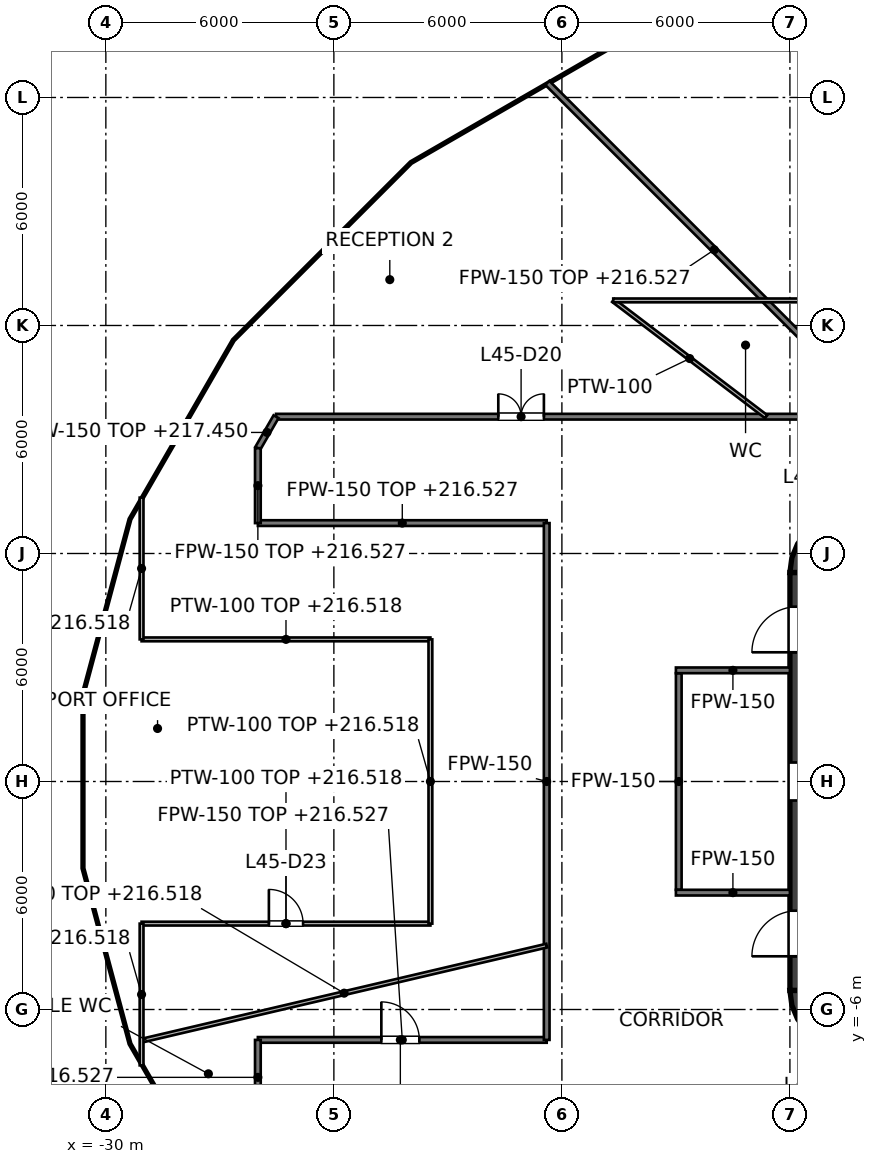
"""IFC4 building model, lengths in metres.
Left out: names, types, materials, properties, quantities, classifications, styles, units other than length and angle.
Written with IfcOpenShell. Run it as: python <this file> out.ifc"""

import sys

from ifc_helpers import new_model, si_unit, direction, frame, frame_2d, origin, place, context, subcontext, project, spatial, polyline, rectangle, outline, extrude, element, fill, save


model = new_model("IFC4")
c1 = context("Model", 3, precision=1e-05, world=origin(), true_north=direction((0.0, 1.0)))
c2 = subcontext(c1, "Body", "Model", "MODEL_VIEW")
j1 = project(units=[si_unit("LENGTHUNIT", "METRE"), si_unit("PLANEANGLEUNIT", "RADIAN")], contexts=[c1])
p1 = place(None, origin())
s1 = spatial("IfcSite", under=j1, at=p1, CompositionType="ELEMENT")
p2 = place(p1, origin())
s2 = spatial("IfcBuilding", under=s1, at=p2, CompositionType="ELEMENT")
p3 = place(p2, frame((0.0, 0.0, 213.6)))
s3 = spatial("IfcBuildingStorey", under=s2, at=p3, CompositionType="ELEMENT", Elevation=213.6)
p4 = place(p3, frame((-11.8, -5.5, 0.0), z_axis=(0.0, 0.0, 1.0), x_axis=(0.0, 1.0, 0.0)))
e1 = element("IfcWall", 1, at=p4, inside=s3, PredefinedType="SHEAR", context=c2, shape_type="SweptSolid", body=[
    extrude(rectangle(XDim=11.0, YDim=0.4, at=frame_2d((5.5, 0.0))), origin(), (0.0, 0.0, 1.0), 4.0),
])
p5 = place(p4, frame((5.0, 0.0, 0.0)))
e2 = element("IfcOpeningElement", 2, at=p5, cuts=e1, PredefinedType="OPENING", context=c2, shape_type="SweptSolid", body=[
    extrude(rectangle(XDim=1.0, YDim=2.1, at=frame_2d((0.5, 1.05))), frame((0.0, 0.2, 0.0), z_axis=(0.0, -1.0, 0.0), x_axis=(1.0, 0.0, 0.0)), (0.0, 0.0, 1.0), 0.4),
])
p6 = place(p4, frame((0.9, 0.0, 0.0)))
e3 = element("IfcOpeningElement", 3, at=p6, cuts=e1, PredefinedType="OPENING", context=c2, shape_type="SweptSolid", body=[
    extrude(rectangle(XDim=1.2, YDim=2.1, at=frame_2d((0.6, 1.05))), frame((0.0, 0.2, 0.0), z_axis=(0.0, -1.0, 0.0), x_axis=(1.0, 0.0, 0.0)), (0.0, 0.0, 1.0), 0.4),
])
p7 = place(p4, frame((8.9, 0.0, 0.0)))
e4 = element("IfcOpeningElement", 4, at=p7, cuts=e1, PredefinedType="OPENING", context=c2, shape_type="SweptSolid", body=[
    extrude(rectangle(XDim=1.2, YDim=2.1, at=frame_2d((0.6, 1.05))), frame((0.0, 0.2, 0.0), z_axis=(0.0, -1.0, 0.0), x_axis=(1.0, 0.0, 0.0)), (0.0, 0.0, 1.0), 0.4),
])
p8 = place(p3, origin())
e5 = element("IfcWall", 5, at=p8, inside=s3, PredefinedType="SHEAR", context=c2, shape_type="SweptSolid", body=[
    extrude(outline(polyline([(-12.0, 5.5), (-11.596, 5.5), (-11.559, 5.784), (-11.45, 6.048), (-11.275, 6.275), (-11.048, 6.45), (-10.784, 6.559), (-10.5, 6.596), (-10.5, 7.0), (-10.888, 6.949), (-11.25, 6.799), (-11.561, 6.561), (-11.799, 6.25), (-11.949, 5.888), (-12.0, 5.5)])), origin(), (0.0, 0.0, 1.0), 4.0),
])
e6 = element("IfcWall", 6, at=p8, inside=s3, PredefinedType="SHEAR", context=c2, shape_type="SweptSolid", body=[
    extrude(outline(polyline([(-10.5, -7.0), (-10.5, -6.596), (-10.784, -6.559), (-11.048, -6.45), (-11.275, -6.275), (-11.45, -6.048), (-11.559, -5.784), (-11.596, -5.5), (-12.0, -5.5), (-11.949, -5.888), (-11.799, -6.25), (-11.561, -6.561), (-11.25, -6.799), (-10.888, -6.949), (-10.5, -7.0)])), origin(), (0.0, 0.0, 1.0), 4.0),
])
p9 = place(p3, frame((-14.925, -2.85, 0.0), z_axis=(0.0, 0.0, 1.0), x_axis=(0.0, 1.0, 0.0)))
e7 = element("IfcWall", 7, at=p9, inside=s3, PredefinedType="PARTITIONING", context=c2, shape_type="SweptSolid", body=[
    extrude(rectangle(XDim=5.7, YDim=0.15, at=frame_2d((2.85, 0.0))), origin(), (0.0, 0.0, 1.0), 2.918),
])
for number, where, z_axis, x_axis in (
    (8, (-15.0, 2.925, 0.0), (0.0, 0.0, 1.0), (1.0, 0.0, 0.0)),
    (9, (-15.0, -2.925, 0.0), (0.0, 0.0, 1.0), (1.0, 0.0, 0.0)),
):
    element("IfcWall", number, at=place(p3, frame(where, z_axis=z_axis, x_axis=x_axis)), inside=s3, PredefinedType="PARTITIONING", context=c2, shape_type="SweptSolid", body=[
        extrude(rectangle(XDim=3.0, YDim=0.15, at=frame_2d((1.5, 0.0))), origin(), (0.0, 0.0, 1.0), 2.918),
    ])
p10 = place(p3, frame((-18.383, 18.383, 0.0), z_axis=(0.0, 0.0, 1.0), x_axis=(0.707106781187, -0.707106781187, 0.0)))
e10 = element("IfcWall", 10, at=p10, inside=s3, PredefinedType="PARTITIONING", context=c2, shape_type="SweptSolid", body=[
    extrude(rectangle(XDim=12.421, YDim=0.15, at=frame_2d((6.21, 0.0))), origin(), (0.0, 0.0, 1.0), 2.927),
])
p11 = place(p3, frame((-26.0, -6.8, 0.0), z_axis=(0.0, 0.0, 1.0), x_axis=(1.0, 0.0, 0.0)))
e11 = element("IfcWall", 11, at=p11, inside=s3, PredefinedType="PARTITIONING", context=c2, shape_type="SweptSolid", body=[
    extrude(rectangle(XDim=7.6, YDim=0.15, at=frame_2d((3.8, 0.0))), origin(), (0.0, 0.0, 1.0), 2.927),
])
p12 = place(p11, frame((3.249, 0.0, 0.0)))
e12 = element("IfcOpeningElement", 12, at=p12, cuts=e11, PredefinedType="OPENING", context=c2, shape_type="SweptSolid", body=[
    extrude(rectangle(XDim=1.0, YDim=2.1, at=frame_2d((0.5, 1.05))), frame((0.0, 0.075, 0.0), z_axis=(0.0, -1.0, 0.0), x_axis=(1.0, 0.0, 0.0)), (0.0, 0.0, 1.0), 0.15),
])
p13 = place(p3, frame((-26.0, 6.8, 0.0), z_axis=(0.0, 0.0, 1.0), x_axis=(1.0, 0.0, 0.0)))
e13 = element("IfcWall", 13, at=p13, inside=s3, PredefinedType="PARTITIONING", context=c2, shape_type="SweptSolid", body=[
    extrude(rectangle(XDim=7.6, YDim=0.15, at=frame_2d((3.8, 0.0))), origin(), (0.0, 0.0, 1.0), 2.927),
])
p14 = place(p3, frame((-25.522, 9.6, 0.0), z_axis=(0.0, 0.0, 1.0), x_axis=(1.0, 0.0, 0.0)))
e14 = element("IfcWall", 14, at=p14, inside=s3, PredefinedType="PARTITIONING", context=c2, shape_type="SweptSolid", body=[
    extrude(rectangle(XDim=51.044, YDim=0.15, at=frame_2d((25.522, 0.0))), origin(), (0.0, 0.0, 1.0), 2.927),
])
p15 = place(p14, frame((28.517, 0.0, 0.0)))
e15 = element("IfcOpeningElement", 15, at=p15, cuts=e14, PredefinedType="OPENING", context=c2, shape_type="SweptSolid", body=[
    extrude(rectangle(XDim=1.0, YDim=2.1, at=frame_2d((0.5, 1.05))), frame((0.0, 0.075, 0.0), z_axis=(0.0, -1.0, 0.0), x_axis=(1.0, 0.0, 0.0)), (0.0, 0.0, 1.0), 0.15),
])
p16 = place(p14, frame((24.65, 0.0, 0.0)))
e16 = element("IfcOpeningElement", 16, at=p16, cuts=e14, PredefinedType="OPENING", context=c2, shape_type="SweptSolid", body=[
    extrude(rectangle(XDim=1.0, YDim=2.1, at=frame_2d((0.5, 1.05))), frame((0.0, 0.075, 0.0), z_axis=(0.0, -1.0, 0.0), x_axis=(1.0, 0.0, 0.0)), (0.0, 0.0, 1.0), 0.15),
])
p17 = place(p14, frame((19.126, 0.0, 0.0)))
e17 = element("IfcOpeningElement", 17, at=p17, cuts=e14, PredefinedType="OPENING", context=c2, shape_type="SweptSolid", body=[
    extrude(rectangle(XDim=1.0, YDim=2.1, at=frame_2d((0.5, 1.05))), frame((0.0, 0.075, 0.0), z_axis=(0.0, -1.0, 0.0), x_axis=(1.0, 0.0, 0.0)), (0.0, 0.0, 1.0), 0.15),
])
p18 = place(p14, frame((13.909, 0.0, 0.0)))
e18 = element("IfcOpeningElement", 18, at=p18, cuts=e14, PredefinedType="OPENING", context=c2, shape_type="SweptSolid", body=[
    extrude(rectangle(XDim=1.0, YDim=2.1, at=frame_2d((0.5, 1.05))), frame((0.0, 0.075, 0.0), z_axis=(0.0, -1.0, 0.0), x_axis=(1.0, 0.0, 0.0)), (0.0, 0.0, 1.0), 0.15),
])
p19 = place(p14, frame((5.848, 0.0, 0.0)))
e19 = element("IfcOpeningElement", 19, at=p19, cuts=e14, PredefinedType="OPENING", context=c2, shape_type="SweptSolid", body=[
    extrude(rectangle(XDim=1.2, YDim=2.1, at=frame_2d((0.6, 1.05))), frame((0.0, 0.075, 0.0), z_axis=(0.0, -1.0, 0.0), x_axis=(1.0, 0.0, 0.0)), (0.0, 0.0, 1.0), 0.15),
])
p20 = place(p14, frame((38.575, 0.0, 0.0)))
e20 = element("IfcOpeningElement", 20, at=p20, cuts=e14, PredefinedType="OPENING", context=c2, shape_type="SweptSolid", body=[
    extrude(rectangle(XDim=1.0, YDim=2.1, at=frame_2d((0.5, 1.05))), frame((0.0, 0.075, 0.0), z_axis=(0.0, -1.0, 0.0), x_axis=(1.0, 0.0, 0.0)), (0.0, 0.0, 1.0), 0.15),
])
p21 = place(p3, frame((-26.0, 8.771, 0.0), z_axis=(0.0, 0.0, 1.0), x_axis=(0.499980071345, 0.866036909293, 0.0)))
e21 = element("IfcWall", 21, at=p21, inside=s3, PredefinedType="PARTITIONING", context=c2, shape_type="SweptSolid", body=[
    extrude(rectangle(XDim=0.957, YDim=0.15, at=frame_2d((0.479, 0.0))), origin(), (0.0, 0.0, 1.0), 3.85),
])
p22 = place(p3, frame((-18.4, -6.8, 0.0), z_axis=(0.0, 0.0, 1.0), x_axis=(0.0, 1.0, 0.0)))
e22 = element("IfcWall", 22, at=p22, inside=s3, PredefinedType="PARTITIONING", context=c2, shape_type="SweptSolid", body=[
    extrude(rectangle(XDim=13.6, YDim=0.15, at=frame_2d((6.8, 0.0))), origin(), (0.0, 0.0, 1.0), 2.918),
])
for number, where, z_axis, x_axis in (
    (23, (-26.0, -8.771, 0.0), (0.0, 0.0, 1.0), (0.0, 1.0, 0.0)),
    (24, (-26.0, 6.8, 0.0), (0.0, 0.0, 1.0), (0.0, 1.0, 0.0)),
):
    element("IfcWall", number, at=place(p3, frame(where, z_axis=z_axis, x_axis=x_axis)), inside=s3, PredefinedType="PARTITIONING", context=c2, shape_type="SweptSolid", body=[
        extrude(rectangle(XDim=1.971, YDim=0.15, at=frame_2d((0.985, 0.0))), origin(), (0.0, 0.0, 1.0), 2.927),
    ])
p23 = place(p3, frame((-16.649, 12.66, 0.0), z_axis=(0.0, 0.0, 1.0), x_axis=(0.796006750332, -0.605287744322, 0.0)))
e25 = element("IfcWall", 25, at=p23, inside=s3, PredefinedType="PARTITIONING", context=c2, shape_type="SweptSolid", body=[
    extrude(rectangle(XDim=5.055, YDim=0.1, at=frame_2d((2.528, 0.0))), origin(), (0.0, 0.0, 1.0), 2.927),
])
p24 = place(p3, frame((-29.06, -3.74, 0.0), z_axis=(0.0, 0.0, 1.0), x_axis=(1.0, 0.0, 0.0)))
e26 = element("IfcWall", 26, at=p24, inside=s3, PredefinedType="PARTITIONING", context=c2, shape_type="SweptSolid", body=[
    extrude(rectangle(XDim=7.6, YDim=0.1, at=frame_2d((3.8, 0.0))), origin(), (0.0, 0.0, 1.0), 2.918),
])
p25 = place(p24, frame((3.35, 0.0, 0.0)))
e27 = element("IfcOpeningElement", 27, at=p25, cuts=e26, PredefinedType="OPENING", context=c2, shape_type="SweptSolid", body=[
    extrude(rectangle(XDim=0.9, YDim=2.1, at=frame_2d((0.45, 1.05))), frame((0.0, 0.05, 0.0), z_axis=(0.0, -1.0, 0.0), x_axis=(1.0, 0.0, 0.0)), (0.0, 0.0, 1.0), 0.1),
])
p26 = place(p3, frame((-29.06, 3.74, 0.0), z_axis=(0.0, 0.0, 1.0), x_axis=(1.0, 0.0, 0.0)))
e28 = element("IfcWall", 28, at=p26, inside=s3, PredefinedType="PARTITIONING", context=c2, shape_type="SweptSolid", body=[
    extrude(rectangle(XDim=7.6, YDim=0.1, at=frame_2d((3.8, 0.0))), origin(), (0.0, 0.0, 1.0), 2.918),
])
p27 = place(p3, frame((-16.649, 12.66, 0.0), z_axis=(0.0, 0.0, 1.0), x_axis=(1.0, 0.0, 0.0)))
e29 = element("IfcWall", 29, at=p27, inside=s3, PredefinedType="PARTITIONING", context=c2, shape_type="SweptSolid", body=[
    extrude(rectangle(XDim=42.276, YDim=0.1, at=frame_2d((21.138, 0.0))), origin(), (0.0, 0.0, 1.0), 2.927),
])
p28 = place(p27, frame((8.025, 0.0, 0.0)))
e30 = element("IfcOpeningElement", 30, at=p28, cuts=e29, PredefinedType="OPENING", context=c2, shape_type="SweptSolid", body=[
    extrude(rectangle(XDim=1.8, YDim=2.1, at=frame_2d((0.9, 1.05))), frame((0.0, 0.05, 0.0), z_axis=(0.0, -1.0, 0.0), x_axis=(1.0, 0.0, 0.0)), (0.0, 0.0, 1.0), 0.1),
])
p29 = place(p27, frame((32.667, 0.0, 0.0)))
e31 = element("IfcOpeningElement", 31, at=p29, cuts=e29, PredefinedType="OPENING", context=c2, shape_type="SweptSolid", body=[
    extrude(rectangle(XDim=0.9, YDim=2.1, at=frame_2d((0.45, 1.05))), frame((0.0, 0.05, 0.0), z_axis=(0.0, -1.0, 0.0), x_axis=(1.0, 0.0, 0.0)), (0.0, 0.0, 1.0), 0.1),
])
p30 = place(p3, frame((-29.06, -6.821, 0.0), z_axis=(0.0, 0.0, 1.0), x_axis=(0.973545675372, 0.228492489951, 0.0)))
e32 = element("IfcWall", 32, at=p30, inside=s3, PredefinedType="PARTITIONING", context=c2, shape_type="SweptSolid", body=[
    extrude(rectangle(XDim=10.95, YDim=0.1, at=frame_2d((5.475, 0.0))), origin(), (0.0, 0.0, 1.0), 2.918),
])
p31 = place(p3, frame((-21.46, -3.74, 0.0), z_axis=(0.0, 0.0, 1.0), x_axis=(0.0, 1.0, 0.0)))
e33 = element("IfcWall", 33, at=p31, inside=s3, PredefinedType="PARTITIONING", context=c2, shape_type="SweptSolid", body=[
    extrude(rectangle(XDim=7.48, YDim=0.1, at=frame_2d((3.74, 0.0))), origin(), (0.0, 0.0, 1.0), 2.918),
])
for number, where, z_axis, x_axis in (
    (34, (-29.06, -7.47, 0.0), (0.0, 0.0, 1.0), (0.0, 1.0, 0.0)),
    (35, (-29.06, 3.74, 0.0), (0.0, 0.0, 1.0), (0.0, 1.0, 0.0)),
):
    element("IfcWall", number, at=place(p3, frame(where, z_axis=z_axis, x_axis=x_axis)), inside=s3, PredefinedType="PARTITIONING", context=c2, shape_type="SweptSolid", body=[
        extrude(rectangle(XDim=3.73, YDim=0.1, at=frame_2d((1.865, 0.0))), origin(), (0.0, 0.0, 1.0), 2.918),
    ])
p32 = place(p5, origin())
e36 = element("IfcDoor", 36, at=p32, inside=s3, OperationType="SINGLE_SWING_RIGHT", PredefinedType="DOOR", context=c2, shape_type="SweptSolid", body=[
    extrude(rectangle(XDim=1.0, YDim=2.1, at=frame_2d((0.5, 1.05))), frame((0.0, 0.025, 0.0), z_axis=(0.0, -1.0, 0.0), x_axis=(1.0, 0.0, 0.0)), (0.0, 0.0, 1.0), 0.05),
])
fill(e2, e36)
p33 = place(p6, origin())
e37 = element("IfcDoor", 37, at=p33, inside=s3, OperationType="SINGLE_SWING_LEFT", PredefinedType="DOOR", context=c2, shape_type="SweptSolid", body=[
    extrude(rectangle(XDim=1.2, YDim=2.1, at=frame_2d((0.6, 1.05))), frame((0.0, 0.025, 0.0), z_axis=(0.0, -1.0, 0.0), x_axis=(1.0, 0.0, 0.0)), (0.0, 0.0, 1.0), 0.05),
])
fill(e3, e37)
p34 = place(p7, origin())
e38 = element("IfcDoor", 38, at=p34, inside=s3, OperationType="SINGLE_SWING_LEFT", PredefinedType="DOOR", context=c2, shape_type="SweptSolid", body=[
    extrude(rectangle(XDim=1.2, YDim=2.1, at=frame_2d((0.6, 1.05))), frame((0.0, 0.025, 0.0), z_axis=(0.0, -1.0, 0.0), x_axis=(1.0, 0.0, 0.0)), (0.0, 0.0, 1.0), 0.05),
])
fill(e4, e38)
p35 = place(p19, origin())
e39 = element("IfcDoor", 39, at=p35, inside=s3, OperationType="DOUBLE_DOOR_SINGLE_SWING", PredefinedType="DOOR", context=c2, shape_type="SweptSolid", body=[
    extrude(rectangle(XDim=1.2, YDim=2.1, at=frame_2d((0.6, 1.05))), frame((0.0, 0.025, 0.0), z_axis=(0.0, -1.0, 0.0), x_axis=(1.0, 0.0, 0.0)), (0.0, 0.0, 1.0), 0.05),
])
fill(e19, e39)
p36 = place(p12, origin())
e40 = element("IfcDoor", 40, at=p36, inside=s3, OperationType="SINGLE_SWING_LEFT", PredefinedType="DOOR", context=c2, shape_type="SweptSolid", body=[
    extrude(rectangle(XDim=1.0, YDim=2.1, at=frame_2d((0.5, 1.05))), frame((0.0, 0.025, 0.0), z_axis=(0.0, -1.0, 0.0), x_axis=(1.0, 0.0, 0.0)), (0.0, 0.0, 1.0), 0.05),
])
fill(e12, e40)
p37 = place(p25, origin())
e41 = element("IfcDoor", 41, at=p37, inside=s3, OperationType="SINGLE_SWING_LEFT", PredefinedType="DOOR", context=c2, shape_type="SweptSolid", body=[
    extrude(rectangle(XDim=0.9, YDim=2.1, at=frame_2d((0.45, 1.05))), frame((0.0, 0.025, 0.0), z_axis=(0.0, -1.0, 0.0), x_axis=(1.0, 0.0, 0.0)), (0.0, 0.0, 1.0), 0.05),
])
fill(e27, e41)
save(model, sys.argv[1])
